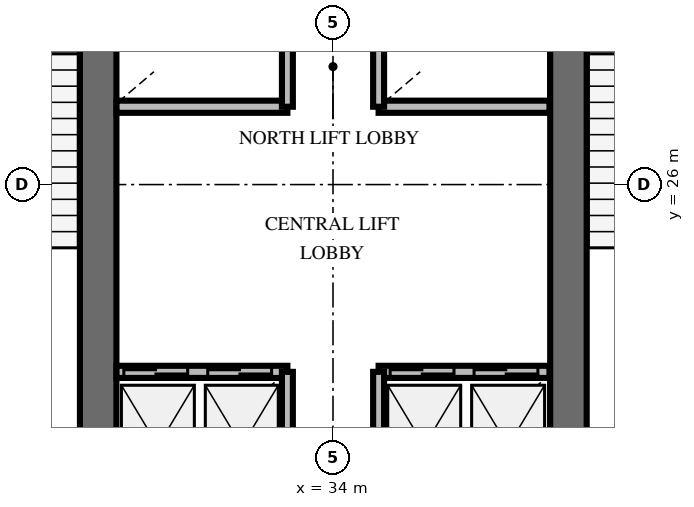
"""IFC4 building model, lengths in metres.
Left out: names, types, materials, properties, quantities, classifications, styles, units other than length and angle.
Written with IfcOpenShell. Run it as: python <this file> out.ifc"""

import sys

from ifc_helpers import new_model, si_unit, direction, frame, frame_2d, origin, place, context, subcontext, project, spatial, rectangle, extrude, element, fill, save


model = new_model("IFC4")
c1 = context("Model", 3, precision=1e-05, world=origin(), true_north=direction((0.0, 1.0)))
c2 = subcontext(c1, "Body", "Model", "MODEL_VIEW")
j1 = project(units=[si_unit("LENGTHUNIT", "METRE"), si_unit("PLANEANGLEUNIT", "RADIAN")], contexts=[c1])
p1 = place(None, origin())
s1 = spatial("IfcSite", under=j1, at=p1, CompositionType="ELEMENT")
p2 = place(p1, origin())
s2 = spatial("IfcBuilding", under=s1, at=p2, CompositionType="ELEMENT")
p3 = place(p2, frame((0.0, 0.0, 125.8)))
s3 = spatial("IfcBuildingStorey", under=s2, at=p3, CompositionType="ELEMENT", Elevation=125.8)
for number, where, z_axis, x_axis in (
    (1, (30.138, 20.187, 0.0), (0.0, 0.0, 1.0), (0.0, 1.0, 0.0)),
    (2, (37.872, 20.187, 0.0), (0.0, 0.0, 1.0), (0.0, 1.0, 0.0)),
):
    element("IfcWall", number, at=place(p3, frame(where, z_axis=z_axis, x_axis=x_axis)), inside=s3, PredefinedType="SHEAR", context=c2, shape_type="SweptSolid", body=[
        extrude(rectangle(XDim=9.826, YDim=0.6, at=frame_2d((4.913, 0.0))), origin(), (0.0, 0.0, 1.0), 4.0),
    ])
p4 = place(p3, frame((30.44, 22.92, 0.0), z_axis=(0.0, 0.0, 1.0), x_axis=(1.0, 0.0, 0.0)))
e3 = element("IfcWall", 3, at=p4, inside=s3, PredefinedType="SOLIDWALL", context=c2, shape_type="SweptSolid", body=[
    extrude(rectangle(XDim=2.81, YDim=0.2, at=frame_2d((1.405, 0.0))), origin(), (0.0, 0.0, 1.0), 2.8),
])
p5 = place(p4, frame((0.12, 0.0, 0.0)))
e4 = element("IfcOpeningElement", 4, at=p5, cuts=e3, PredefinedType="OPENING", context=c2, shape_type="SweptSolid", body=[
    extrude(rectangle(XDim=1.05, YDim=2.1, at=frame_2d((0.525, 1.05))), frame((0.0, 0.11, 0.0), z_axis=(0.0, -1.0, 0.0), x_axis=(1.0, 0.0, 0.0)), (0.0, 0.0, 1.0), 0.22),
])
p6 = place(p4, frame((1.5, 0.0, 0.0)))
e5 = element("IfcOpeningElement", 5, at=p6, cuts=e3, PredefinedType="OPENING", context=c2, shape_type="SweptSolid", body=[
    extrude(rectangle(XDim=1.05, YDim=2.1, at=frame_2d((0.525, 1.05))), frame((0.0, 0.11, 0.0), z_axis=(0.0, -1.0, 0.0), x_axis=(1.0, 0.0, 0.0)), (0.0, 0.0, 1.0), 0.22),
])
p7 = place(p3, frame((33.25, 20.5, 0.0), z_axis=(0.0, 0.0, 1.0), x_axis=(0.0, 1.0, 0.0)))
e6 = element("IfcWall", 6, at=p7, inside=s3, PredefinedType="SOLIDWALL", context=c2, shape_type="SweptSolid", body=[
    extrude(rectangle(XDim=2.42, YDim=0.18, at=frame_2d((1.21, 0.0))), origin(), (0.0, 0.0, 1.0), 2.8),
])
p8 = place(p3, frame((34.75, 22.92, 0.0), z_axis=(0.0, 0.0, 1.0), x_axis=(1.0, 0.0, 0.0)))
e7 = element("IfcWall", 7, at=p8, inside=s3, PredefinedType="SOLIDWALL", context=c2, shape_type="SweptSolid", body=[
    extrude(rectangle(XDim=2.81, YDim=0.2, at=frame_2d((1.405, 0.0))), origin(), (0.0, 0.0, 1.0), 2.8),
])
p9 = place(p8, frame((0.19, 0.0, 0.0)))
e8 = element("IfcOpeningElement", 8, at=p9, cuts=e7, PredefinedType="OPENING", context=c2, shape_type="SweptSolid", body=[
    extrude(rectangle(XDim=1.05, YDim=2.1, at=frame_2d((0.525, 1.05))), frame((0.0, 0.11, 0.0), z_axis=(0.0, -1.0, 0.0), x_axis=(1.0, 0.0, 0.0)), (0.0, 0.0, 1.0), 0.22),
])
p10 = place(p8, frame((1.57, 0.0, 0.0)))
e9 = element("IfcOpeningElement", 9, at=p10, cuts=e7, PredefinedType="OPENING", context=c2, shape_type="SweptSolid", body=[
    extrude(rectangle(XDim=1.05, YDim=2.1, at=frame_2d((0.525, 1.05))), frame((0.0, 0.11, 0.0), z_axis=(0.0, -1.0, 0.0), x_axis=(1.0, 0.0, 0.0)), (0.0, 0.0, 1.0), 0.22),
])
p11 = place(p3, frame((34.75, 20.5, 0.0), z_axis=(0.0, 0.0, 1.0), x_axis=(0.0, 1.0, 0.0)))
e10 = element("IfcWall", 10, at=p11, inside=s3, PredefinedType="SOLIDWALL", context=c2, shape_type="SweptSolid", body=[
    extrude(rectangle(XDim=2.42, YDim=0.18, at=frame_2d((1.21, 0.0))), origin(), (0.0, 0.0, 1.0), 2.8),
])
p12 = place(p3, frame((30.44, 27.28, 0.0), z_axis=(0.0, 0.0, 1.0), x_axis=(1.0, 0.0, 0.0)))
e11 = element("IfcWall", 11, at=p12, inside=s3, PredefinedType="SOLIDWALL", context=c2, shape_type="SweptSolid", body=[
    extrude(rectangle(XDim=2.81, YDim=0.2, at=frame_2d((1.405, 0.0))), origin(), (0.0, 0.0, 1.0), 2.8),
])
p13 = place(p3, frame((33.25, 27.28, 0.0), z_axis=(0.0, 0.0, 1.0), x_axis=(0.0, 1.0, 0.0)))
e12 = element("IfcWall", 12, at=p13, inside=s3, PredefinedType="SOLIDWALL", context=c2, shape_type="SweptSolid", body=[
    extrude(rectangle(XDim=2.47, YDim=0.18, at=frame_2d((1.235, 0.0))), origin(), (0.0, 0.0, 1.0), 2.8),
])
p14 = place(p3, frame((34.75, 27.28, 0.0), z_axis=(0.0, 0.0, 1.0), x_axis=(1.0, 0.0, 0.0)))
e13 = element("IfcWall", 13, at=p14, inside=s3, PredefinedType="SOLIDWALL", context=c2, shape_type="SweptSolid", body=[
    extrude(rectangle(XDim=2.81, YDim=0.2, at=frame_2d((1.405, 0.0))), origin(), (0.0, 0.0, 1.0), 2.8),
])
p15 = place(p3, frame((34.75, 27.28, 0.0), z_axis=(0.0, 0.0, 1.0), x_axis=(0.0, 1.0, 0.0)))
e14 = element("IfcWall", 14, at=p15, inside=s3, PredefinedType="SOLIDWALL", context=c2, shape_type="SweptSolid", body=[
    extrude(rectangle(XDim=2.47, YDim=0.18, at=frame_2d((1.235, 0.0))), origin(), (0.0, 0.0, 1.0), 2.8),
])
p16 = place(p5, origin())
e15 = element("IfcDoor", 15, at=p16, inside=s3, OperationType="DOUBLE_DOOR_SLIDING", PredefinedType="USERDEFINED", context=c2, shape_type="SweptSolid", body=[
    extrude(rectangle(XDim=1.05, YDim=2.1, at=frame_2d((0.525, 1.05))), frame((0.0, 0.025, 0.0), z_axis=(0.0, -1.0, 0.0), x_axis=(1.0, 0.0, 0.0)), (0.0, 0.0, 1.0), 0.05),
])
fill(e4, e15)
p17 = place(p6, origin())
e16 = element("IfcDoor", 16, at=p17, inside=s3, OperationType="DOUBLE_DOOR_SLIDING", PredefinedType="USERDEFINED", context=c2, shape_type="SweptSolid", body=[
    extrude(rectangle(XDim=1.05, YDim=2.1, at=frame_2d((0.525, 1.05))), frame((0.0, 0.025, 0.0), z_axis=(0.0, -1.0, 0.0), x_axis=(1.0, 0.0, 0.0)), (0.0, 0.0, 1.0), 0.05),
])
fill(e5, e16)
p18 = place(p9, origin())
e17 = element("IfcDoor", 17, at=p18, inside=s3, OperationType="DOUBLE_DOOR_SLIDING", PredefinedType="USERDEFINED", context=c2, shape_type="SweptSolid", body=[
    extrude(rectangle(XDim=1.05, YDim=2.1, at=frame_2d((0.525, 1.05))), frame((0.0, 0.025, 0.0), z_axis=(0.0, -1.0, 0.0), x_axis=(1.0, 0.0, 0.0)), (0.0, 0.0, 1.0), 0.05),
])
fill(e8, e17)
p19 = place(p10, origin())
e18 = element("IfcDoor", 18, at=p19, inside=s3, OperationType="DOUBLE_DOOR_SLIDING", PredefinedType="USERDEFINED", context=c2, shape_type="SweptSolid", body=[
    extrude(rectangle(XDim=1.05, YDim=2.1, at=frame_2d((0.525, 1.05))), frame((0.0, 0.025, 0.0), z_axis=(0.0, -1.0, 0.0), x_axis=(1.0, 0.0, 0.0)), (0.0, 0.0, 1.0), 0.05),
])
fill(e9, e18)
save(model, sys.argv[1])
